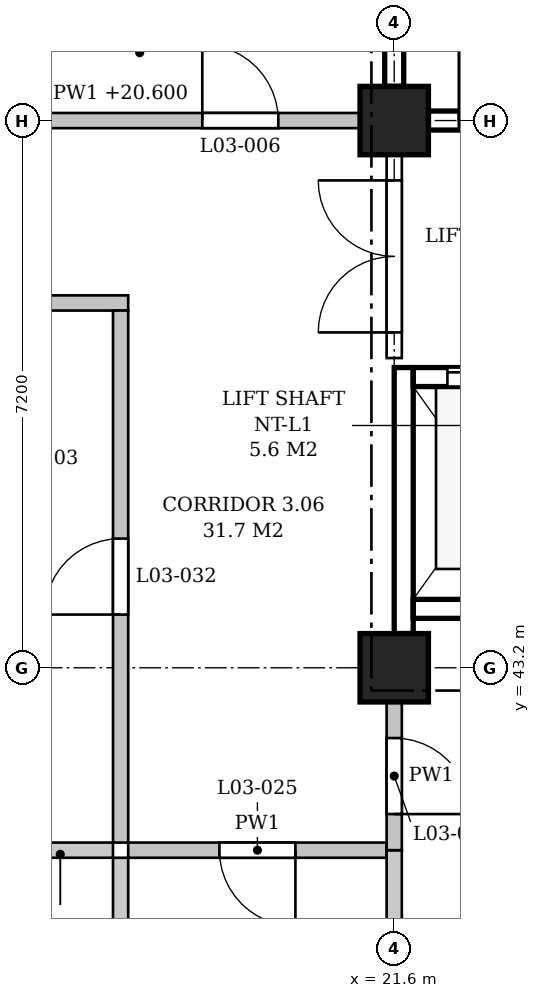
"""IFC4 building model, lengths in metres.
Left out: names, types, materials, properties, quantities, classifications, styles, units other than length and angle.
Written with IfcOpenShell. Run it as: python <this file> out.ifc"""

import sys

from ifc_helpers import new_model, si_unit, direction, frame, frame_2d, origin, origin_2d, place, context, subcontext, project, spatial, polyline, rectangle, outline, extrude, element, fill, save


model = new_model("IFC4")
c1 = context("Model", 3, precision=1e-05, world=origin(), true_north=direction((0.0, 1.0)))
c2 = subcontext(c1, "Body", "Model", "MODEL_VIEW")
j1 = project(units=[si_unit("LENGTHUNIT", "METRE"), si_unit("PLANEANGLEUNIT", "RADIAN")], contexts=[c1])
p1 = place(None, origin())
s1 = spatial("IfcSite", under=j1, at=p1, CompositionType="ELEMENT")
p2 = place(p1, origin())
s2 = spatial("IfcBuilding", under=s1, at=p2, CompositionType="ELEMENT")
p3 = place(p2, frame((0.0, 0.0, 16.8)))
s3 = spatial("IfcBuildingStorey", under=s2, at=p3, CompositionType="ELEMENT", Elevation=16.8)
for number, where, z_axis, x_axis in (
    (1, (21.6, 43.2, 0.0), (0.0, 0.0, 1.0), (1.0, 0.0, 0.0)),
    (2, (21.6, 50.4, 0.0), (0.0, 0.0, 1.0), (1.0, 0.0, 0.0)),
):
    element("IfcColumn", number, at=place(p3, frame(where, z_axis=z_axis, x_axis=x_axis)), inside=s3, PredefinedType="COLUMN", context=c2, shape_type="SweptSolid", body=[
        extrude(rectangle(XDim=0.9, YDim=0.9, at=origin_2d()), origin(), (0.0, 0.0, 1.0), 4.8),
    ])
p4 = place(p3, frame((22.05, 50.4, 0.0), z_axis=(0.0, 0.0, 1.0), x_axis=(1.0, 0.0, 0.0)))
e3 = element("IfcWall", 3, at=p4, inside=s3, PredefinedType="SHEAR", context=c2, shape_type="SweptSolid", body=[
    extrude(rectangle(XDim=6.3, YDim=0.25, at=frame_2d((3.15, 0.0))), origin(), (0.0, 0.0, 1.0), 3.8),
])
p5 = place(p4, frame((0.4, 0.0, 0.0)))
e4 = element("IfcOpeningElement", 4, at=p5, cuts=e3, PredefinedType="OPENING", context=c2, shape_type="SweptSolid", body=[
    extrude(rectangle(XDim=1.1, YDim=2.1, at=frame_2d((0.55, 1.05))), frame((0.0, 0.135, 0.0), z_axis=(0.0, -1.0, 0.0), x_axis=(1.0, 0.0, 0.0)), (0.0, 0.0, 1.0), 0.27),
])
p6 = place(p3, frame((21.6, 50.85, 0.0), z_axis=(0.0, 0.0, 1.0), x_axis=(0.0, 1.0, 0.0)))
e5 = element("IfcWall", 5, at=p6, inside=s3, PredefinedType="SHEAR", context=c2, shape_type="SweptSolid", body=[
    extrude(rectangle(XDim=6.3, YDim=0.25, at=frame_2d((3.15, 0.0))), origin(), (0.0, 0.0, 1.0), 3.8),
])
p7 = place(p3, frame((21.725, 43.65, -0.25), z_axis=(0.0, 0.0, 1.0), x_axis=(0.0, 1.0, 0.0)))
e6 = element("IfcWall", 6, at=p7, inside=s3, PredefinedType="SHEAR", context=c2, shape_type="SweptSolid", body=[
    extrude(rectangle(XDim=3.5, YDim=0.25, at=frame_2d((1.75, 0.0))), origin(), (0.0, 0.0, 1.0), 4.05),
])
p8 = place(p3, frame((21.85, 47.025, -0.25), z_axis=(0.0, 0.0, 1.0), x_axis=(1.0, 0.0, 0.0)))
e7 = element("IfcWall", 7, at=p8, inside=s3, PredefinedType="SHEAR", context=c2, shape_type="SweptSolid", body=[
    extrude(rectangle(XDim=2.0, YDim=0.25, at=frame_2d((1.0, 0.0))), origin(), (0.0, 0.0, 1.0), 4.8),
])
p9 = place(p8, frame((0.45, 0.0, 0.25)))
e8 = element("IfcOpeningElement", 8, at=p9, cuts=e7, PredefinedType="OPENING", context=c2, shape_type="SweptSolid", body=[
    extrude(rectangle(XDim=1.1, YDim=2.1, at=frame_2d((0.55, 1.05))), frame((0.0, 0.135, 0.0), z_axis=(0.0, -1.0, 0.0), x_axis=(1.0, 0.0, 0.0)), (0.0, 0.0, 1.0), 0.27),
])
p10 = place(p3, frame((21.85, 43.975, -0.25), z_axis=(0.0, 0.0, 1.0), x_axis=(1.0, 0.0, 0.0)))
e9 = element("IfcWall", 9, at=p10, inside=s3, PredefinedType="SHEAR", context=c2, shape_type="SweptSolid", body=[
    extrude(rectangle(XDim=2.0, YDim=0.25, at=frame_2d((1.0, 0.0))), origin(), (0.0, 0.0, 1.0), 4.8),
])
p11 = place(p3, frame((10.9, 40.8, 0.0), z_axis=(0.0, 0.0, 1.0), x_axis=(1.0, 0.0, 0.0)))
e10 = element("IfcWall", 10, at=p11, inside=s3, PredefinedType="PARTITIONING", context=c2, shape_type="SweptSolid", body=[
    extrude(outline(polyline([(0.0, 0.0), (7.0, 0.0), (7.0, 4.55), (3.75, 4.55), (3.75, 3.8), (3.25, 3.8), (3.25, 4.55), (0.0, 4.55), (0.0, 0.0)])), frame((0.0, 0.1, 0.0), z_axis=(0.0, -1.0, 0.0), x_axis=(1.0, 0.0, 0.0)), (0.0, 0.0, 1.0), 0.2),
])
p12 = place(p11, frame((1.25, 0.0, 0.0)))
e11 = element("IfcOpeningElement", 11, at=p12, cuts=e10, PredefinedType="OPENING", context=c2, shape_type="SweptSolid", body=[
    extrude(rectangle(XDim=1.0, YDim=2.1, at=frame_2d((0.5, 1.05))), frame((0.0, 0.11, 0.0), z_axis=(0.0, -1.0, 0.0), x_axis=(1.0, 0.0, 0.0)), (0.0, 0.0, 1.0), 0.22),
])
p13 = place(p11, frame((4.75, 0.0, 0.0)))
e12 = element("IfcOpeningElement", 12, at=p13, cuts=e10, PredefinedType="OPENING", context=c2, shape_type="SweptSolid", body=[
    extrude(rectangle(XDim=1.0, YDim=2.1, at=frame_2d((0.5, 1.05))), frame((0.0, 0.11, 0.0), z_axis=(0.0, -1.0, 0.0), x_axis=(1.0, 0.0, 0.0)), (0.0, 0.0, 1.0), 0.22),
])
p14 = place(p3, frame((18.1, 40.8, 0.0), z_axis=(0.0, 0.0, 1.0), x_axis=(1.0, 0.0, 0.0)))
e13 = element("IfcWall", 13, at=p14, inside=s3, PredefinedType="PARTITIONING", context=c2, shape_type="SweptSolid", body=[
    extrude(outline(polyline([(0.0, 0.0), (3.4, 0.0), (3.4, 3.8), (3.25, 3.8), (3.25, 4.55), (0.0, 4.55), (0.0, 0.0)])), frame((0.0, 0.1, 0.0), z_axis=(0.0, -1.0, 0.0), x_axis=(1.0, 0.0, 0.0)), (0.0, 0.0, 1.0), 0.2),
])
p15 = place(p14, frame((1.2, 0.0, 0.0)))
e14 = element("IfcOpeningElement", 14, at=p15, cuts=e13, PredefinedType="OPENING", context=c2, shape_type="SweptSolid", body=[
    extrude(rectangle(XDim=1.0, YDim=2.1, at=frame_2d((0.5, 1.05))), frame((0.0, 0.11, 0.0), z_axis=(0.0, -1.0, 0.0), x_axis=(1.0, 0.0, 0.0)), (0.0, 0.0, 1.0), 0.22),
])
p16 = place(p3, frame((3.5, 48.0, 0.0), z_axis=(0.0, 0.0, 1.0), x_axis=(1.0, 0.0, 0.0)))
e15 = element("IfcWall", 15, at=p16, inside=s3, PredefinedType="PARTITIONING", context=c2, shape_type="SweptSolid", body=[
    extrude(outline(polyline([(0.0, 0.0), (14.6, 0.0), (14.6, 4.55), (11.15, 4.55), (11.15, 3.8), (10.65, 3.8), (10.65, 4.55), (3.95, 4.55), (3.95, 3.8), (3.45, 3.8), (3.45, 4.55), (0.0, 4.55), (0.0, 0.0)])), frame((0.0, 0.1, 0.0), z_axis=(0.0, -1.0, 0.0), x_axis=(1.0, 0.0, 0.0)), (0.0, 0.0, 1.0), 0.2),
])
p17 = place(p16, frame((1.4, 0.0, 0.0)))
e16 = element("IfcOpeningElement", 16, at=p17, cuts=e15, PredefinedType="OPENING", context=c2, shape_type="SweptSolid", body=[
    extrude(rectangle(XDim=1.0, YDim=2.1, at=frame_2d((0.5, 1.05))), frame((0.0, 0.11, 0.0), z_axis=(0.0, -1.0, 0.0), x_axis=(1.0, 0.0, 0.0)), (0.0, 0.0, 1.0), 0.22),
])
p18 = place(p16, frame((5.0, 0.0, 0.0)))
e17 = element("IfcOpeningElement", 17, at=p18, cuts=e15, PredefinedType="OPENING", context=c2, shape_type="SweptSolid", body=[
    extrude(rectangle(XDim=1.0, YDim=2.1, at=frame_2d((0.5, 1.05))), frame((0.0, 0.11, 0.0), z_axis=(0.0, -1.0, 0.0), x_axis=(1.0, 0.0, 0.0)), (0.0, 0.0, 1.0), 0.22),
])
p19 = place(p3, frame((14.85, 50.4, 0.0), z_axis=(0.0, 0.0, 1.0), x_axis=(1.0, 0.0, 0.0)))
e18 = element("IfcWall", 18, at=p19, inside=s3, PredefinedType="PARTITIONING", context=c2, shape_type="SweptSolid", body=[
    extrude(rectangle(XDim=6.3, YDim=0.2, at=frame_2d((3.15, 0.0))), origin(), (0.0, 0.0, 1.0), 3.8),
])
p20 = place(p19, frame((4.225, 0.0, 0.0)))
e19 = element("IfcOpeningElement", 19, at=p20, cuts=e18, PredefinedType="OPENING", context=c2, shape_type="SweptSolid", body=[
    extrude(rectangle(XDim=1.0, YDim=2.1, at=frame_2d((0.5, 1.05))), frame((0.0, 0.11, 0.0), z_axis=(0.0, -1.0, 0.0), x_axis=(1.0, 0.0, 0.0)), (0.0, 0.0, 1.0), 0.22),
])
p21 = place(p3, frame((18.0, 36.15, 0.0), z_axis=(0.0, 0.0, 1.0), x_axis=(0.0, 1.0, 0.0)))
e20 = element("IfcWall", 20, at=p21, inside=s3, PredefinedType="PARTITIONING", context=c2, shape_type="SweptSolid", body=[
    extrude(outline(polyline([(0.0, 0.0), (4.55, 0.0), (4.55, 4.55), (0.1, 4.55), (0.1, 3.95), (0.0, 3.95), (0.0, 0.0)])), frame((0.0, 0.1, 0.0), z_axis=(0.0, -1.0, 0.0), x_axis=(1.0, 0.0, 0.0)), (0.0, 0.0, 1.0), 0.2),
])
p22 = place(p3, frame((18.0, 40.9, 0.0), z_axis=(0.0, 0.0, 1.0), x_axis=(0.0, 1.0, 0.0)))
e21 = element("IfcWall", 21, at=p22, inside=s3, PredefinedType="PARTITIONING", context=c2, shape_type="SweptSolid", body=[
    extrude(outline(polyline([(0.0, 0.0), (7.0, 0.0), (7.0, 4.55), (2.55, 4.55), (2.55, 3.8), (2.05, 3.8), (2.05, 4.55), (0.0, 4.55), (0.0, 0.0)])), frame((0.0, 0.1, 0.0), z_axis=(0.0, -1.0, 0.0), x_axis=(1.0, 0.0, 0.0)), (0.0, 0.0, 1.0), 0.2),
])
p23 = place(p22, frame((3.0, 0.0, 0.0)))
e22 = element("IfcOpeningElement", 22, at=p23, cuts=e21, PredefinedType="OPENING", context=c2, shape_type="SweptSolid", body=[
    extrude(rectangle(XDim=1.0, YDim=2.1, at=frame_2d((0.5, 1.05))), frame((0.0, 0.11, 0.0), z_axis=(0.0, -1.0, 0.0), x_axis=(1.0, 0.0, 0.0)), (0.0, 0.0, 1.0), 0.22),
])
p24 = place(p3, frame((21.6, 36.45, 0.0), z_axis=(0.0, 0.0, 1.0), x_axis=(0.0, 1.0, 0.0)))
e23 = element("IfcWall", 23, at=p24, inside=s3, PredefinedType="PARTITIONING", context=c2, shape_type="SweptSolid", body=[
    extrude(rectangle(XDim=4.35, YDim=0.2, at=frame_2d((2.175, 0.0))), origin(), (0.0, 0.0, 1.0), 3.8),
])
p25 = place(p3, frame((21.6, 40.8, 0.0), z_axis=(0.0, 0.0, 1.0), x_axis=(0.0, 1.0, 0.0)))
e24 = element("IfcWall", 24, at=p25, inside=s3, PredefinedType="PARTITIONING", context=c2, shape_type="SweptSolid", body=[
    extrude(rectangle(XDim=1.95, YDim=0.2, at=frame_2d((0.975, 0.0))), origin(), (0.0, 0.0, 1.0), 3.8),
])
p26 = place(p25, frame((0.475, 0.0, 0.0)))
e25 = element("IfcOpeningElement", 25, at=p26, cuts=e24, PredefinedType="OPENING", context=c2, shape_type="SweptSolid", body=[
    extrude(rectangle(XDim=1.0, YDim=2.1, at=frame_2d((0.5, 1.05))), frame((0.0, 0.11, 0.0), z_axis=(0.0, -1.0, 0.0), x_axis=(1.0, 0.0, 0.0)), (0.0, 0.0, 1.0), 0.22),
])
p27 = place(p3, frame((21.6, 47.275, 0.0), z_axis=(0.0, 0.0, 1.0), x_axis=(0.0, 1.0, 0.0)))
e26 = element("IfcWall", 26, at=p27, inside=s3, PredefinedType="PARTITIONING", context=c2, shape_type="SweptSolid", body=[
    extrude(rectangle(XDim=2.675, YDim=0.2, at=frame_2d((1.337, 0.0))), origin(), (0.0, 0.0, 1.0), 3.8),
])
p28 = place(p27, frame((0.337, 0.0, 0.0)))
e27 = element("IfcOpeningElement", 27, at=p28, cuts=e26, PredefinedType="OPENING", context=c2, shape_type="SweptSolid", body=[
    extrude(rectangle(XDim=2.0, YDim=2.4, at=frame_2d((1.0, 1.2))), frame((0.0, 0.11, 0.0), z_axis=(0.0, -1.0, 0.0), x_axis=(1.0, 0.0, 0.0)), (0.0, 0.0, 1.0), 0.22),
])
p29 = place(p5, origin())
e28 = element("IfcDoor", 28, at=p29, inside=s3, OperationType="SINGLE_SWING_LEFT", PredefinedType="DOOR", context=c2, shape_type="SweptSolid", body=[
    extrude(rectangle(XDim=1.1, YDim=2.1, at=frame_2d((0.55, 1.05))), frame((0.0, 0.025, 0.0), z_axis=(0.0, -1.0, 0.0), x_axis=(1.0, 0.0, 0.0)), (0.0, 0.0, 1.0), 0.05),
])
fill(e4, e28)
p30 = place(p9, origin())
e29 = element("IfcDoor", 29, at=p30, inside=s3, OperationType="SLIDING_TO_LEFT", PredefinedType="DOOR", context=c2, shape_type="SweptSolid", body=[
    extrude(rectangle(XDim=1.1, YDim=2.1, at=frame_2d((0.55, 1.05))), frame((0.0, 0.025, 0.0), z_axis=(0.0, -1.0, 0.0), x_axis=(1.0, 0.0, 0.0)), (0.0, 0.0, 1.0), 0.05),
])
fill(e8, e29)
p31 = place(p28, origin())
e30 = element("IfcDoor", 30, at=p31, inside=s3, OperationType="DOUBLE_DOOR_SINGLE_SWING", PredefinedType="DOOR", context=c2, shape_type="SweptSolid", body=[
    extrude(rectangle(XDim=2.0, YDim=2.4, at=frame_2d((1.0, 1.2))), frame((0.0, 0.025, 0.0), z_axis=(0.0, -1.0, 0.0), x_axis=(1.0, 0.0, 0.0)), (0.0, 0.0, 1.0), 0.05),
])
fill(e27, e30)
p32 = place(p20, origin())
e31 = element("IfcDoor", 31, at=p32, inside=s3, OperationType="SINGLE_SWING_LEFT", PredefinedType="DOOR", context=c2, shape_type="SweptSolid", body=[
    extrude(rectangle(XDim=1.0, YDim=2.1, at=frame_2d((0.5, 1.05))), frame((0.0, 0.025, 0.0), z_axis=(0.0, -1.0, 0.0), x_axis=(1.0, 0.0, 0.0)), (0.0, 0.0, 1.0), 0.05),
])
fill(e19, e31)
p33 = place(p15, frame((1.0, 0.0, 0.0), z_axis=(0.0, 0.0, 1.0), x_axis=(-1.0, 0.0, 0.0)))
e32 = element("IfcDoor", 32, at=p33, inside=s3, OperationType="SINGLE_SWING_LEFT", PredefinedType="DOOR", context=c2, shape_type="SweptSolid", body=[
    extrude(rectangle(XDim=1.0, YDim=2.1, at=frame_2d((0.5, 1.05))), frame((0.0, 0.025, 0.0), z_axis=(0.0, -1.0, 0.0), x_axis=(1.0, 0.0, 0.0)), (0.0, 0.0, 1.0), 0.05),
])
fill(e14, e32)
p34 = place(p26, frame((1.0, 0.0, 0.0), z_axis=(0.0, 0.0, 1.0), x_axis=(-1.0, 0.0, 0.0)))
e33 = element("IfcDoor", 33, at=p34, inside=s3, OperationType="SINGLE_SWING_RIGHT", PredefinedType="DOOR", context=c2, shape_type="SweptSolid", body=[
    extrude(rectangle(XDim=1.0, YDim=2.1, at=frame_2d((0.5, 1.05))), frame((0.0, 0.025, 0.0), z_axis=(0.0, -1.0, 0.0), x_axis=(1.0, 0.0, 0.0)), (0.0, 0.0, 1.0), 0.05),
])
fill(e25, e33)
p35 = place(p23, origin())
e34 = element("IfcDoor", 34, at=p35, inside=s3, OperationType="SINGLE_SWING_LEFT", PredefinedType="DOOR", context=c2, shape_type="SweptSolid", body=[
    extrude(rectangle(XDim=1.0, YDim=2.1, at=frame_2d((0.5, 1.05))), frame((0.0, 0.025, 0.0), z_axis=(0.0, -1.0, 0.0), x_axis=(1.0, 0.0, 0.0)), (0.0, 0.0, 1.0), 0.05),
])
fill(e22, e34)
save(model, sys.argv[1])
